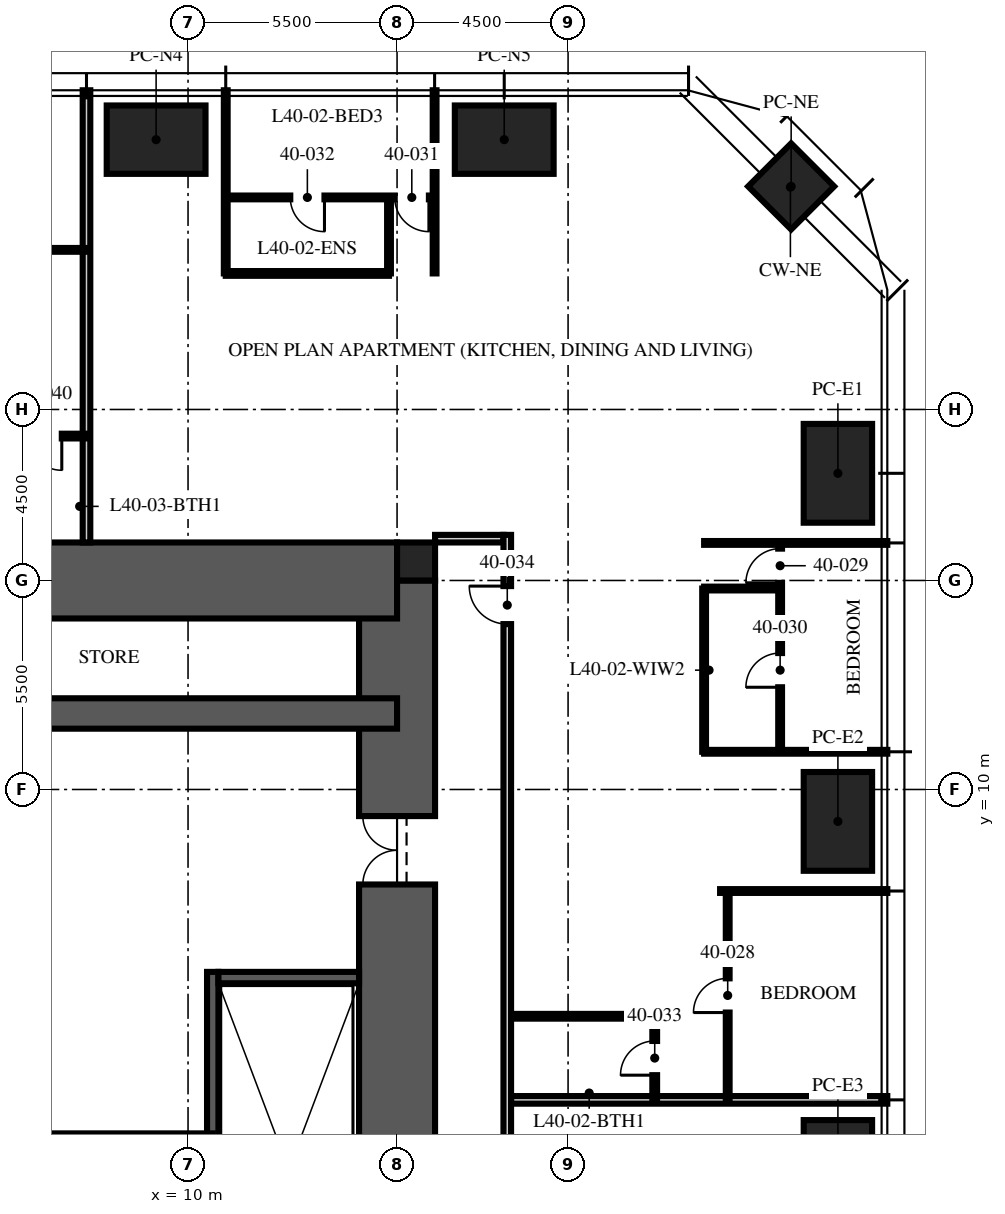
"""IFC4 building model, lengths in metres.
Left out: names, types, materials, properties, quantities, classifications, styles, units other than length and angle.
Written with IfcOpenShell. Run it as: python <this file> out.ifc"""

import sys

from ifc_helpers import new_model, si_unit, direction, frame, frame_2d, origin, origin_2d, place, context, subcontext, project, spatial, rectangle, extrude, element, fill, save


model = new_model("IFC4")
c1 = context("Model", 3, precision=1e-05, world=origin(), true_north=direction((0.0, 1.0)))
c2 = subcontext(c1, "Body", "Model", "MODEL_VIEW")
j1 = project(units=[si_unit("LENGTHUNIT", "METRE"), si_unit("PLANEANGLEUNIT", "RADIAN")], contexts=[c1])
p1 = place(None, origin())
s1 = spatial("IfcSite", under=j1, at=p1, CompositionType="ELEMENT")
p2 = place(p1, origin())
s2 = spatial("IfcBuilding", under=s1, at=p2, CompositionType="ELEMENT")
p3 = place(p2, frame((0.0, 0.0, 159.75)))
s3 = spatial("IfcBuildingStorey", under=s2, at=p3, CompositionType="ELEMENT", Elevation=159.75)
p4 = place(p3, frame((15.5, -15.5, -0.25), z_axis=(0.0, 0.0, 1.0), x_axis=(0.0, 1.0, 0.0)))
e1 = element("IfcWall", 1, at=p4, inside=s3, PredefinedType="SHEAR", context=c2, shape_type="SweptSolid", body=[
    extrude(rectangle(XDim=31.0, YDim=2.0, at=frame_2d((15.5, 0.0))), origin(), (0.0, 0.0, 1.0), 3.75),
])
p5 = place(p4, frame((6.5, 0.0, 0.25)))
e2 = element("IfcOpeningElement", 2, at=p5, cuts=e1, PredefinedType="OPENING", context=c2, shape_type="SweptSolid", body=[
    extrude(rectangle(XDim=1.2, YDim=2.1, at=frame_2d((0.6, 1.05))), frame((0.0, 1.01, 0.0), z_axis=(0.0, -1.0, 0.0), x_axis=(1.0, 0.0, 0.0)), (0.0, 0.0, 1.0), 2.02),
])
p6 = place(p4, frame((23.0, 0.0, 0.25)))
e3 = element("IfcOpeningElement", 3, at=p6, cuts=e1, PredefinedType="OPENING", context=c2, shape_type="SweptSolid", body=[
    extrude(rectangle(XDim=1.8, YDim=2.1, at=frame_2d((0.9, 1.05))), frame((0.0, 1.01, 0.0), z_axis=(0.0, -1.0, 0.0), x_axis=(1.0, 0.0, 0.0)), (0.0, 0.0, 1.0), 2.02),
])
p7 = place(p3, frame((-15.5, 15.5, -0.25), z_axis=(0.0, 0.0, 1.0), x_axis=(1.0, 0.0, 0.0)))
e4 = element("IfcWall", 4, at=p7, inside=s3, PredefinedType="SHEAR", context=c2, shape_type="SweptSolid", body=[
    extrude(rectangle(XDim=31.0, YDim=2.0, at=frame_2d((15.5, 0.0))), origin(), (0.0, 0.0, 1.0), 3.75),
])
p8 = place(p7, frame((5.0, 0.0, 0.25)))
e5 = element("IfcOpeningElement", 5, at=p8, cuts=e4, PredefinedType="OPENING", context=c2, shape_type="SweptSolid", body=[
    extrude(rectangle(XDim=1.0, YDim=2.1, at=frame_2d((0.5, 1.05))), frame((0.0, 1.01, 0.0), z_axis=(0.0, -1.0, 0.0), x_axis=(1.0, 0.0, 0.0)), (0.0, 0.0, 1.0), 2.02),
])
p9 = place(p3, frame((-15.5, 12.0, -0.25), z_axis=(0.0, 0.0, 1.0), x_axis=(1.0, 0.0, 0.0)))
e6 = element("IfcWall", 6, at=p9, inside=s3, PredefinedType="SHEAR", context=c2, shape_type="SweptSolid", body=[
    extrude(rectangle(XDim=31.0, YDim=0.8, at=frame_2d((15.5, 0.0))), origin(), (0.0, 0.0, 1.0), 3.75),
])
p10 = place(p3, frame((16.0, 16.0, -0.25), z_axis=(0.0, 0.0, 1.0), x_axis=(1.0, 0.0, 0.0)))
e7 = element("IfcColumn", 7, at=p10, inside=s3, PredefinedType="COLUMN", context=c2, shape_type="SweptSolid", body=[
    extrude(rectangle(XDim=1.0, YDim=1.0, at=origin_2d()), origin(), (0.0, 0.0, 1.0), 3.75),
])
for number, where, z_axis, x_axis in (
    (8, (9.16, 27.1, 0.0), (0.0, 0.0, 1.0), (1.0, 0.0, 0.0)),
    (9, (18.32, 27.1, 0.0), (0.0, 0.0, 1.0), (1.0, 0.0, 0.0)),
    (10, (27.1, 18.32, 0.0), (0.0, 0.0, 1.0), (0.0, 1.0, 0.0)),
    (11, (27.1, 9.16, 0.0), (0.0, 0.0, 1.0), (0.0, 1.0, 0.0)),
    (12, (27.1, 0.0, 0.0), (0.0, 0.0, 1.0), (0.0, 1.0, 0.0)),
):
    element("IfcColumn", number, at=place(p3, frame(where, z_axis=z_axis, x_axis=x_axis)), inside=s3, PredefinedType="COLUMN", context=c2, shape_type="SweptSolid", body=[
        extrude(rectangle(XDim=2.6, YDim=1.8, at=origin_2d()), origin(), (0.0, 0.0, 1.0), 3.75),
    ])
p11 = place(p3, frame((25.87, 25.87, 0.0), z_axis=(0.0, 0.0, 1.0), x_axis=(0.707106781187, -0.707106781187, 0.0)))
e13 = element("IfcColumn", 13, at=p11, inside=s3, PredefinedType="COLUMN", context=c2, shape_type="SweptSolid", body=[
    extrude(rectangle(XDim=1.6, YDim=1.6, at=origin_2d()), origin(), (0.0, 0.0, 1.0), 3.75),
])
p12 = place(p3, frame((10.65, -4.9, 0.0), z_axis=(0.0, 0.0, 1.0), x_axis=(0.0, 1.0, 0.0)))
e14 = element("IfcWall", 14, at=p12, inside=s3, PredefinedType="SOLIDWALL", context=c2, shape_type="SweptSolid", body=[
    extrude(rectangle(XDim=10.1, YDim=0.3, at=frame_2d((5.05, 0.0))), origin(), (0.0, 0.0, 1.0), 3.5),
])
p13 = place(p3, frame((14.5, 5.05, 0.0), z_axis=(0.0, 0.0, 1.0), x_axis=(-1.0, 0.0, 0.0)))
e15 = element("IfcWall", 15, at=p13, inside=s3, PredefinedType="SOLIDWALL", context=c2, shape_type="SweptSolid", body=[
    extrude(rectangle(XDim=3.7, YDim=0.3, at=frame_2d((1.85, 0.0))), origin(), (0.0, 0.0, 1.0), 3.5),
])
p14 = place(p3, frame((-10.65, 0.8, 0.0), z_axis=(0.0, 0.0, 1.0), x_axis=(1.0, 0.0, 0.0)))
e16 = element("IfcWall", 16, at=p14, inside=s3, PredefinedType="PARTITIONING", context=c2, shape_type="SweptSolid", body=[
    extrude(rectangle(XDim=21.3, YDim=0.3, at=frame_2d((10.65, 0.0))), origin(), (0.0, 0.0, 1.0), 3.5),
])
p15 = place(p14, frame((10.05, 0.0, 0.0)))
e17 = element("IfcOpeningElement", 17, at=p15, cuts=e16, PredefinedType="OPENING", context=c2, shape_type="SweptSolid", body=[
    extrude(rectangle(XDim=1.2, YDim=2.1, at=frame_2d((0.6, 1.05))), frame((0.0, 0.16, 0.0), z_axis=(0.0, -1.0, 0.0), x_axis=(1.0, 0.0, 0.0)), (0.0, 0.0, 1.0), 0.32),
])
p16 = place(p14, frame((0.793, 0.0, 0.0)))
e18 = element("IfcOpeningElement", 18, at=p16, cuts=e16, PredefinedType="OPENING", context=c2, shape_type="SweptSolid", body=[
    extrude(rectangle(XDim=0.9, YDim=2.1, at=frame_2d((0.45, 1.05))), frame((0.0, 0.16, 0.0), z_axis=(0.0, -1.0, 0.0), x_axis=(1.0, 0.0, 0.0)), (0.0, 0.0, 1.0), 0.32),
])
p17 = place(p3, frame((16.5, 16.6, 0.0), z_axis=(0.0, 0.0, 1.0), x_axis=(1.0, 0.0, 0.0)))
e19 = element("IfcWall", 19, at=p17, inside=s3, PredefinedType="PARTITIONING", context=c2, shape_type="SweptSolid", body=[
    extrude(rectangle(XDim=1.8, YDim=0.2, at=frame_2d((0.9, 0.0))), origin(), (0.0, 0.0, 1.0), 2.3),
])
p18 = place(p3, frame((18.5, 1.832, 0.0), z_axis=(0.0, 0.0, 1.0), x_axis=(1.0, 0.0, 0.0)))
e20 = element("IfcWall", 20, at=p18, inside=s3, PredefinedType="PARTITIONING", context=c2, shape_type="SweptSolid", body=[
    extrude(rectangle(XDim=9.9, YDim=0.2, at=frame_2d((4.95, 0.0))), origin(), (0.0, 0.0, 1.0), 2.81),
])
p19 = place(p3, frame((24.0, 7.328, 0.0), z_axis=(0.0, 0.0, 1.0), x_axis=(1.0, 0.0, 0.0)))
e21 = element("IfcWall", 21, at=p19, inside=s3, PredefinedType="PARTITIONING", context=c2, shape_type="SweptSolid", body=[
    extrude(rectangle(XDim=4.4, YDim=0.1, at=frame_2d((2.2, 0.0))), origin(), (0.0, 0.0, 1.0), 2.81),
])
for number, where, z_axis, x_axis in (
    (22, (23.58, 10.992, 0.0), (0.0, 0.0, 1.0), (1.0, 0.0, 0.0)),
    (23, (23.58, 16.488, 0.0), (0.0, 0.0, 1.0), (1.0, 0.0, 0.0)),
    (24, (16.488, 23.58, 0.0), (0.0, 0.0, 1.0), (0.0, 1.0, 0.0)),
    (25, (10.992, 23.58, 0.0), (0.0, 0.0, 1.0), (0.0, 1.0, 0.0)),
):
    element("IfcWall", number, at=place(p3, frame(where, z_axis=z_axis, x_axis=x_axis)), inside=s3, PredefinedType="PARTITIONING", context=c2, shape_type="SweptSolid", body=[
        extrude(rectangle(XDim=4.82, YDim=0.1, at=frame_2d((2.41, 0.0))), origin(), (0.0, 0.0, 1.0), 2.81),
    ])
p20 = place(p3, frame((7.328, 16.5, 0.0), z_axis=(0.0, 0.0, 1.0), x_axis=(0.0, 1.0, 0.0)))
e26 = element("IfcWall", 26, at=p20, inside=s3, PredefinedType="PARTITIONING", context=c2, shape_type="SweptSolid", body=[
    extrude(rectangle(XDim=11.9, YDim=0.2, at=frame_2d((5.95, 0.0))), origin(), (0.0, 0.0, 1.0), 2.81),
])
p21 = place(p3, frame((24.2, 1.832, 0.0), z_axis=(0.0, 0.0, 1.0), x_axis=(0.0, 1.0, 0.0)))
e27 = element("IfcWall", 27, at=p21, inside=s3, PredefinedType="PARTITIONING", context=c2, shape_type="SweptSolid", body=[
    extrude(rectangle(XDim=5.496, YDim=0.1, at=frame_2d((2.748, 0.0))), origin(), (0.0, 0.0, 1.0), 2.81),
])
p22 = place(p21, frame((2.298, 0.0, 0.0)))
e28 = element("IfcOpeningElement", 28, at=p22, cuts=e27, PredefinedType="OPENING", context=c2, shape_type="SweptSolid", body=[
    extrude(rectangle(XDim=0.9, YDim=2.1, at=frame_2d((0.45, 1.05))), frame((0.0, 0.06, 0.0), z_axis=(0.0, -1.0, 0.0), x_axis=(1.0, 0.0, 0.0)), (0.0, 0.0, 1.0), 0.12),
])
p23 = place(p3, frame((25.58, 10.992, 0.0), z_axis=(0.0, 0.0, 1.0), x_axis=(0.0, 1.0, 0.0)))
e29 = element("IfcWall", 29, at=p23, inside=s3, PredefinedType="PARTITIONING", context=c2, shape_type="SweptSolid", body=[
    extrude(rectangle(XDim=5.496, YDim=0.1, at=frame_2d((2.748, 0.0))), origin(), (0.0, 0.0, 1.0), 2.81),
])
p24 = place(p23, frame((4.446, 0.0, 0.0)))
e30 = element("IfcOpeningElement", 30, at=p24, cuts=e29, PredefinedType="OPENING", context=c2, shape_type="SweptSolid", body=[
    extrude(rectangle(XDim=0.9, YDim=2.1, at=frame_2d((0.45, 1.05))), frame((0.0, 0.06, 0.0), z_axis=(0.0, -1.0, 0.0), x_axis=(1.0, 0.0, 0.0)), (0.0, 0.0, 1.0), 0.12),
])
p25 = place(p23, frame((1.698, 0.0, 0.0)))
e31 = element("IfcOpeningElement", 31, at=p25, cuts=e29, PredefinedType="OPENING", context=c2, shape_type="SweptSolid", body=[
    extrude(rectangle(XDim=0.9, YDim=2.1, at=frame_2d((0.45, 1.05))), frame((0.0, 0.06, 0.0), z_axis=(0.0, -1.0, 0.0), x_axis=(1.0, 0.0, 0.0)), (0.0, 0.0, 1.0), 0.12),
])
p26 = place(p3, frame((23.58, 15.288, 0.0), z_axis=(0.0, 0.0, 1.0), x_axis=(1.0, 0.0, 0.0)))
e32 = element("IfcWall", 32, at=p26, inside=s3, PredefinedType="PARTITIONING", context=c2, shape_type="SweptSolid", body=[
    extrude(rectangle(XDim=2.0, YDim=0.1, at=frame_2d((1.0, 0.0))), origin(), (0.0, 0.0, 1.0), 3.5),
])
p27 = place(p3, frame((23.58, 10.992, 0.0), z_axis=(0.0, 0.0, 1.0), x_axis=(0.0, 1.0, 0.0)))
e33 = element("IfcWall", 33, at=p27, inside=s3, PredefinedType="PARTITIONING", context=c2, shape_type="SweptSolid", body=[
    extrude(rectangle(XDim=4.296, YDim=0.1, at=frame_2d((2.148, 0.0))), origin(), (0.0, 0.0, 1.0), 2.81),
])
p28 = place(p3, frame((16.488, 25.58, 0.0), z_axis=(0.0, 0.0, 1.0), x_axis=(-1.0, 0.0, 0.0)))
e34 = element("IfcWall", 34, at=p28, inside=s3, PredefinedType="PARTITIONING", context=c2, shape_type="SweptSolid", body=[
    extrude(rectangle(XDim=5.496, YDim=0.1, at=frame_2d((2.748, 0.0))), origin(), (0.0, 0.0, 1.0), 2.81),
])
p29 = place(p28, frame((0.15, 0.0, 0.0)))
e35 = element("IfcOpeningElement", 35, at=p29, cuts=e34, PredefinedType="OPENING", context=c2, shape_type="SweptSolid", body=[
    extrude(rectangle(XDim=0.9, YDim=2.1, at=frame_2d((0.45, 1.05))), frame((0.0, 0.06, 0.0), z_axis=(0.0, -1.0, 0.0), x_axis=(1.0, 0.0, 0.0)), (0.0, 0.0, 1.0), 0.12),
])
p30 = place(p28, frame((2.898, 0.0, 0.0)))
e36 = element("IfcOpeningElement", 36, at=p30, cuts=e34, PredefinedType="OPENING", context=c2, shape_type="SweptSolid", body=[
    extrude(rectangle(XDim=0.9, YDim=2.1, at=frame_2d((0.45, 1.05))), frame((0.0, 0.06, 0.0), z_axis=(0.0, -1.0, 0.0), x_axis=(1.0, 0.0, 0.0)), (0.0, 0.0, 1.0), 0.12),
])
p31 = place(p3, frame((15.288, 23.58, 0.0), z_axis=(0.0, 0.0, 1.0), x_axis=(0.0, 1.0, 0.0)))
e37 = element("IfcWall", 37, at=p31, inside=s3, PredefinedType="PARTITIONING", context=c2, shape_type="SweptSolid", body=[
    extrude(rectangle(XDim=2.0, YDim=0.1, at=frame_2d((1.0, 0.0))), origin(), (0.0, 0.0, 1.0), 3.5),
])
p32 = place(p3, frame((15.288, 23.58, 0.0), z_axis=(0.0, 0.0, 1.0), x_axis=(-1.0, 0.0, 0.0)))
e38 = element("IfcWall", 38, at=p32, inside=s3, PredefinedType="PARTITIONING", context=c2, shape_type="SweptSolid", body=[
    extrude(rectangle(XDim=4.296, YDim=0.125, at=frame_2d((2.148, 0.0))), origin(), (0.0, 0.0, 1.0), 2.81),
])
p33 = place(p3, frame((22.28, 1.832, 0.0), z_axis=(0.0, 0.0, 1.0), x_axis=(0.0, 1.0, 0.0)))
e39 = element("IfcWall", 39, at=p33, inside=s3, PredefinedType="PARTITIONING", context=c2, shape_type="SweptSolid", body=[
    extrude(rectangle(XDim=2.2, YDim=0.125, at=frame_2d((1.1, 0.0))), origin(), (0.0, 0.0, 1.0), 3.5),
])
p34 = place(p33, frame((0.65, 0.0, 0.0)))
e40 = element("IfcOpeningElement", 40, at=p34, cuts=e39, PredefinedType="OPENING", context=c2, shape_type="SweptSolid", body=[
    extrude(rectangle(XDim=0.9, YDim=2.1, at=frame_2d((0.45, 1.05))), frame((0.0, 0.073, 0.0), z_axis=(0.0, -1.0, 0.0), x_axis=(1.0, 0.0, 0.0)), (0.0, 0.0, 1.0), 0.145),
])
p35 = place(p3, frame((18.5, 4.032, 0.0), z_axis=(0.0, 0.0, 1.0), x_axis=(1.0, 0.0, 0.0)))
e41 = element("IfcWall", 41, at=p35, inside=s3, PredefinedType="PARTITIONING", context=c2, shape_type="SweptSolid", body=[
    extrude(rectangle(XDim=3.78, YDim=0.125, at=frame_2d((1.89, 0.0))), origin(), (0.0, 0.0, 1.0), 3.5),
])
p36 = place(p3, frame((7.328, 24.2, 0.0), z_axis=(0.0, 0.0, 1.0), x_axis=(-1.0, 0.0, 0.0)))
e42 = element("IfcWall", 42, at=p36, inside=s3, PredefinedType="PARTITIONING", context=c2, shape_type="SweptSolid", body=[
    extrude(rectangle(XDim=5.496, YDim=0.1, at=frame_2d((2.748, 0.0))), origin(), (0.0, 0.0, 1.0), 2.81),
])
p37 = place(p36, frame((2.298, 0.0, 0.0)))
e43 = element("IfcOpeningElement", 43, at=p37, cuts=e42, PredefinedType="OPENING", context=c2, shape_type="SweptSolid", body=[
    extrude(rectangle(XDim=0.9, YDim=2.1, at=frame_2d((0.45, 1.05))), frame((0.0, 0.06, 0.0), z_axis=(0.0, -1.0, 0.0), x_axis=(1.0, 0.0, 0.0)), (0.0, 0.0, 1.0), 0.12),
])
p38 = place(p3, frame((7.328, 19.3, 0.0), z_axis=(0.0, 0.0, 1.0), x_axis=(-1.0, 0.0, 0.0)))
e44 = element("IfcWall", 44, at=p38, inside=s3, PredefinedType="PARTITIONING", context=c2, shape_type="SweptSolid", body=[
    extrude(rectangle(XDim=6.2, YDim=0.125, at=frame_2d((3.1, 0.0))), origin(), (0.0, 0.0, 1.0), 2.81),
])
p39 = place(p38, frame((0.65, 0.0, 0.0)))
e45 = element("IfcOpeningElement", 45, at=p39, cuts=e44, PredefinedType="OPENING", context=c2, shape_type="SweptSolid", body=[
    extrude(rectangle(XDim=0.9, YDim=2.1, at=frame_2d((0.45, 1.05))), frame((0.0, 0.073, 0.0), z_axis=(0.0, -1.0, 0.0), x_axis=(1.0, 0.0, 0.0)), (0.0, 0.0, 1.0), 0.145),
])
p40 = place(p38, frame((2.85, 0.0, 0.0)))
e46 = element("IfcOpeningElement", 46, at=p40, cuts=e44, PredefinedType="OPENING", context=c2, shape_type="SweptSolid", body=[
    extrude(rectangle(XDim=0.9, YDim=2.1, at=frame_2d((0.45, 1.05))), frame((0.0, 0.073, 0.0), z_axis=(0.0, -1.0, 0.0), x_axis=(1.0, 0.0, 0.0)), (0.0, 0.0, 1.0), 0.145),
])
p41 = place(p38, frame((4.85, 0.0, 0.0)))
e47 = element("IfcOpeningElement", 47, at=p41, cuts=e44, PredefinedType="OPENING", context=c2, shape_type="SweptSolid", body=[
    extrude(rectangle(XDim=0.9, YDim=2.1, at=frame_2d((0.45, 1.05))), frame((0.0, 0.073, 0.0), z_axis=(0.0, -1.0, 0.0), x_axis=(1.0, 0.0, 0.0)), (0.0, 0.0, 1.0), 0.145),
])
p42 = place(p3, frame((18.4, -5.328, 0.0), z_axis=(0.0, 0.0, 1.0), x_axis=(0.0, 1.0, 0.0)))
e48 = element("IfcWall", 48, at=p42, inside=s3, PredefinedType="PARTITIONING", context=c2, shape_type="SweptSolid", body=[
    extrude(rectangle(XDim=22.028, YDim=0.2, at=frame_2d((11.014, 0.0))), origin(), (0.0, 0.0, 1.0), 2.7),
])
p43 = place(p42, frame((19.68, 0.0, 0.0)))
e49 = element("IfcOpeningElement", 49, at=p43, cuts=e48, PredefinedType="OPENING", context=c2, shape_type="SweptSolid", body=[
    extrude(rectangle(XDim=1.0, YDim=2.2, at=frame_2d((0.5, 1.1))), frame((0.0, 0.11, 0.0), z_axis=(0.0, -1.0, 0.0), x_axis=(1.0, 0.0, 0.0)), (0.0, 0.0, 1.0), 0.22),
])
p44 = place(p6, origin())
e50 = element("IfcDoor", 50, at=p44, inside=s3, OperationType="DOUBLE_DOOR_SINGLE_SWING", PredefinedType="DOOR", context=c2, shape_type="SweptSolid", body=[
    extrude(rectangle(XDim=1.8, YDim=2.1, at=frame_2d((0.9, 1.05))), frame((0.0, 0.025, 0.0), z_axis=(0.0, -1.0, 0.0), x_axis=(1.0, 0.0, 0.0)), (0.0, 0.0, 1.0), 0.05),
])
fill(e3, e50)
p45 = place(p22, origin())
e51 = element("IfcDoor", 51, at=p45, inside=s3, OperationType="SINGLE_SWING_LEFT", PredefinedType="DOOR", context=c2, shape_type="SweptSolid", body=[
    extrude(rectangle(XDim=0.9, YDim=2.1, at=frame_2d((0.45, 1.05))), frame((0.0, 0.025, 0.0), z_axis=(0.0, -1.0, 0.0), x_axis=(1.0, 0.0, 0.0)), (0.0, 0.0, 1.0), 0.05),
])
fill(e28, e51)
p46 = place(p24, origin())
e52 = element("IfcDoor", 52, at=p46, inside=s3, OperationType="SINGLE_SWING_LEFT", PredefinedType="DOOR", context=c2, shape_type="SweptSolid", body=[
    extrude(rectangle(XDim=0.9, YDim=2.1, at=frame_2d((0.45, 1.05))), frame((0.0, 0.025, 0.0), z_axis=(0.0, -1.0, 0.0), x_axis=(1.0, 0.0, 0.0)), (0.0, 0.0, 1.0), 0.05),
])
fill(e30, e52)
p47 = place(p25, origin())
e53 = element("IfcDoor", 53, at=p47, inside=s3, OperationType="SINGLE_SWING_LEFT", PredefinedType="DOOR", context=c2, shape_type="SweptSolid", body=[
    extrude(rectangle(XDim=0.9, YDim=2.1, at=frame_2d((0.45, 1.05))), frame((0.0, 0.025, 0.0), z_axis=(0.0, -1.0, 0.0), x_axis=(1.0, 0.0, 0.0)), (0.0, 0.0, 1.0), 0.05),
])
fill(e31, e53)
p48 = place(p29, origin())
e54 = element("IfcDoor", 54, at=p48, inside=s3, OperationType="SINGLE_SWING_LEFT", PredefinedType="DOOR", context=c2, shape_type="SweptSolid", body=[
    extrude(rectangle(XDim=0.9, YDim=2.1, at=frame_2d((0.45, 1.05))), frame((0.0, 0.025, 0.0), z_axis=(0.0, -1.0, 0.0), x_axis=(1.0, 0.0, 0.0)), (0.0, 0.0, 1.0), 0.05),
])
fill(e35, e54)
p49 = place(p30, origin())
e55 = element("IfcDoor", 55, at=p49, inside=s3, OperationType="SINGLE_SWING_LEFT", PredefinedType="DOOR", context=c2, shape_type="SweptSolid", body=[
    extrude(rectangle(XDim=0.9, YDim=2.1, at=frame_2d((0.45, 1.05))), frame((0.0, 0.025, 0.0), z_axis=(0.0, -1.0, 0.0), x_axis=(1.0, 0.0, 0.0)), (0.0, 0.0, 1.0), 0.05),
])
fill(e36, e55)
p50 = place(p34, origin())
e56 = element("IfcDoor", 56, at=p50, inside=s3, OperationType="SINGLE_SWING_LEFT", PredefinedType="DOOR", context=c2, shape_type="SweptSolid", body=[
    extrude(rectangle(XDim=0.9, YDim=2.1, at=frame_2d((0.45, 1.05))), frame((0.0, 0.025, 0.0), z_axis=(0.0, -1.0, 0.0), x_axis=(1.0, 0.0, 0.0)), (0.0, 0.0, 1.0), 0.05),
])
fill(e40, e56)
p51 = place(p43, origin())
e57 = element("IfcDoor", 57, at=p51, inside=s3, OperationType="SINGLE_SWING_RIGHT", PredefinedType="DOOR", context=c2, shape_type="SweptSolid", body=[
    extrude(rectangle(XDim=1.0, YDim=2.2, at=frame_2d((0.5, 1.1))), frame((0.0, 0.025, 0.0), z_axis=(0.0, -1.0, 0.0), x_axis=(1.0, 0.0, 0.0)), (0.0, 0.0, 1.0), 0.05),
])
fill(e49, e57)
p52 = place(p39, origin())
e58 = element("IfcDoor", 58, at=p52, inside=s3, OperationType="SINGLE_SWING_LEFT", PredefinedType="DOOR", context=c2, shape_type="SweptSolid", body=[
    extrude(rectangle(XDim=0.9, YDim=2.1, at=frame_2d((0.45, 1.05))), frame((0.0, 0.025, 0.0), z_axis=(0.0, -1.0, 0.0), x_axis=(1.0, 0.0, 0.0)), (0.0, 0.0, 1.0), 0.05),
])
fill(e45, e58)
save(model, sys.argv[1])
